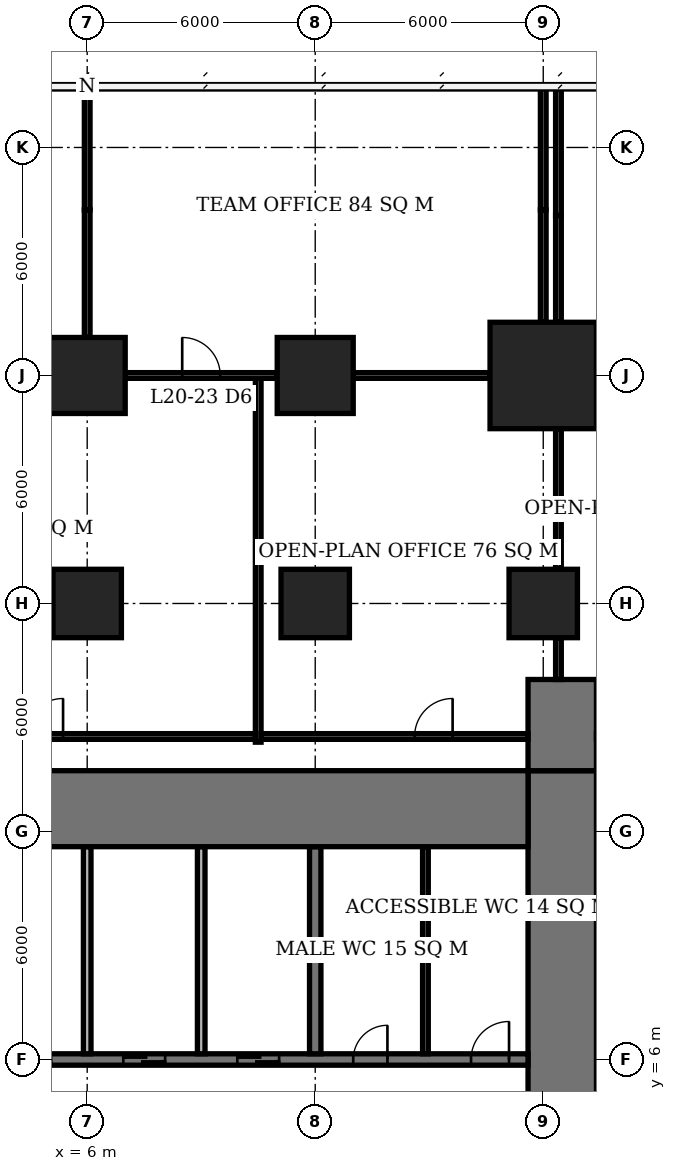
"""IFC4 building model, lengths in metres.
Left out: names, types, materials, properties, quantities, classifications, styles, units other than length and angle.
Written with IfcOpenShell. Run it as: python <this file> out.ifc"""

import sys

from ifc_helpers import new_model, si_unit, direction, frame, frame_2d, origin, origin_2d, place, context, subcontext, project, spatial, rectangle, extrude, element, fill, save


model = new_model("IFC4")
c1 = context("Model", 3, precision=1e-05, world=origin(), true_north=direction((0.0, 1.0)))
c2 = subcontext(c1, "Body", "Model", "MODEL_VIEW")
j1 = project(units=[si_unit("LENGTHUNIT", "METRE"), si_unit("PLANEANGLEUNIT", "RADIAN")], contexts=[c1])
p1 = place(None, origin())
s1 = spatial("IfcSite", under=j1, at=p1, CompositionType="ELEMENT")
p2 = place(p1, origin())
s2 = spatial("IfcBuilding", under=s1, at=p2, CompositionType="ELEMENT")
p3 = place(p2, frame((0.0, 0.0, 84.5)))
s3 = spatial("IfcBuildingStorey", under=s2, at=p3, CompositionType="ELEMENT", Elevation=84.5)
p4 = place(p3, frame((6.0, 18.0, 0.0), z_axis=(0.0, 0.0, 1.0), x_axis=(1.0, 0.0, 0.0)))
e1 = element("IfcColumn", 1, at=p4, inside=s3, PredefinedType="COLUMN", context=c2, shape_type="SweptSolid", body=[
    extrude(rectangle(XDim=1.8, YDim=1.8, at=origin_2d()), origin(), (0.0, 0.0, 1.0), 3.9),
])
p5 = place(p3, frame((6.0, 24.0, 0.0), z_axis=(0.0, 0.0, 1.0), x_axis=(1.0, 0.0, 0.0)))
e2 = element("IfcColumn", 2, at=p5, inside=s3, PredefinedType="COLUMN", context=c2, shape_type="SweptSolid", body=[
    extrude(rectangle(XDim=2.0, YDim=2.0, at=origin_2d()), origin(), (0.0, 0.0, 1.0), 3.9),
])
p6 = place(p3, frame((12.0, 18.0, 0.0), z_axis=(0.0, 0.0, 1.0), x_axis=(1.0, 0.0, 0.0)))
e3 = element("IfcColumn", 3, at=p6, inside=s3, PredefinedType="COLUMN", context=c2, shape_type="SweptSolid", body=[
    extrude(rectangle(XDim=1.8, YDim=1.8, at=origin_2d()), origin(), (0.0, 0.0, 1.0), 3.9),
])
p7 = place(p3, frame((12.0, 24.0, 0.0), z_axis=(0.0, 0.0, 1.0), x_axis=(1.0, 0.0, 0.0)))
e4 = element("IfcColumn", 4, at=p7, inside=s3, PredefinedType="COLUMN", context=c2, shape_type="SweptSolid", body=[
    extrude(rectangle(XDim=2.0, YDim=2.0, at=origin_2d()), origin(), (0.0, 0.0, 1.0), 3.9),
])
p8 = place(p3, frame((18.0, 18.0, 0.0), z_axis=(0.0, 0.0, 1.0), x_axis=(1.0, 0.0, 0.0)))
e5 = element("IfcColumn", 5, at=p8, inside=s3, PredefinedType="COLUMN", context=c2, shape_type="SweptSolid", body=[
    extrude(rectangle(XDim=1.8, YDim=1.8, at=origin_2d()), origin(), (0.0, 0.0, 1.0), 3.9),
])
p9 = place(p3, frame((18.0, 24.0, 0.0), z_axis=(0.0, 0.0, 1.0), x_axis=(1.0, 0.0, 0.0)))
e6 = element("IfcColumn", 6, at=p9, inside=s3, PredefinedType="COLUMN", context=c2, shape_type="SweptSolid", body=[
    extrude(rectangle(XDim=2.8, YDim=2.8, at=origin_2d()), origin(), (0.0, 0.0, 1.0), 3.9),
])
p10 = place(p3, frame((-5.6, 12.6, 0.0), z_axis=(0.0, 0.0, 1.0), x_axis=(1.0, 0.0, 0.0)))
e7 = element("IfcWall", 7, at=p10, inside=s3, PredefinedType="SHEAR", context=c2, shape_type="SweptSolid", body=[
    extrude(rectangle(XDim=23.2, YDim=2.0, at=frame_2d((11.6, 0.0))), origin(), (0.0, 0.0, 1.0), 3.9),
])
p11 = place(p3, frame((18.5, -7.6, 0.0), z_axis=(0.0, 0.0, 1.0), x_axis=(0.0, 1.0, 0.0)))
e8 = element("IfcWall", 8, at=p11, inside=s3, PredefinedType="SHEAR", context=c2, shape_type="SweptSolid", body=[
    extrude(rectangle(XDim=21.2, YDim=1.8, at=frame_2d((10.6, 0.0))), origin(), (0.0, 0.0, 1.0), 3.9),
])
p12 = place(p11, frame((9.2, 0.0, 0.0)))
e9 = element("IfcOpeningElement", 9, at=p12, cuts=e8, PredefinedType="OPENING", context=c2, shape_type="SweptSolid", body=[
    extrude(rectangle(XDim=1.8, YDim=2.4, at=frame_2d((0.9, 1.2))), frame((0.0, 0.91, 0.0), z_axis=(0.0, -1.0, 0.0), x_axis=(1.0, 0.0, 0.0)), (0.0, 0.0, 1.0), 1.82),
])
p13 = place(p3, frame((18.5, 13.6, 0.0), z_axis=(0.0, 0.0, 1.0), x_axis=(0.0, 1.0, 0.0)))
e10 = element("IfcWall", 10, at=p13, inside=s3, PredefinedType="SHEAR", context=c2, shape_type="SweptSolid", body=[
    extrude(rectangle(XDim=2.4, YDim=1.8, at=frame_2d((1.2, 0.0))), origin(), (0.0, 0.0, 1.0), 3.9),
])
p14 = place(p3, frame((-0.15, 6.0, 0.0), z_axis=(0.0, 0.0, 1.0), x_axis=(1.0, 0.0, 0.0)))
e11 = element("IfcWall", 11, at=p14, inside=s3, PredefinedType="SHEAR", context=c2, shape_type="SweptSolid", body=[
    extrude(rectangle(XDim=17.75, YDim=0.3, at=frame_2d((8.875, 0.0))), origin(), (0.0, 0.0, 1.0), 3.9),
])
p15 = place(p14, frame((13.15, 0.0, 0.0)))
e12 = element("IfcOpeningElement", 12, at=p15, cuts=e11, PredefinedType="OPENING", context=c2, shape_type="SweptSolid", body=[
    extrude(rectangle(XDim=0.9, YDim=2.1, at=frame_2d((0.45, 1.05))), frame((0.0, 0.16, 0.0), z_axis=(0.0, -1.0, 0.0), x_axis=(1.0, 0.0, 0.0)), (0.0, 0.0, 1.0), 0.32),
])
p16 = place(p14, frame((16.25, 0.0, 0.0)))
e13 = element("IfcOpeningElement", 13, at=p16, cuts=e11, PredefinedType="OPENING", context=c2, shape_type="SweptSolid", body=[
    extrude(rectangle(XDim=1.0, YDim=2.1, at=frame_2d((0.5, 1.05))), frame((0.0, 0.16, 0.0), z_axis=(0.0, -1.0, 0.0), x_axis=(1.0, 0.0, 0.0)), (0.0, 0.0, 1.0), 0.32),
])
p17 = place(p14, frame((1.1, 0.0, 0.0)))
e14 = element("IfcOpeningElement", 14, at=p17, cuts=e11, PredefinedType="OPENING", context=c2, shape_type="SweptSolid", body=[
    extrude(rectangle(XDim=1.1, YDim=2.1, at=frame_2d((0.55, 1.05))), frame((0.0, 0.16, 0.0), z_axis=(0.0, -1.0, 0.0), x_axis=(1.0, 0.0, 0.0)), (0.0, 0.0, 1.0), 0.32),
])
p18 = place(p14, frame((4.1, 0.0, 0.0)))
e15 = element("IfcOpeningElement", 15, at=p18, cuts=e11, PredefinedType="OPENING", context=c2, shape_type="SweptSolid", body=[
    extrude(rectangle(XDim=1.1, YDim=2.1, at=frame_2d((0.55, 1.05))), frame((0.0, 0.16, 0.0), z_axis=(0.0, -1.0, 0.0), x_axis=(1.0, 0.0, 0.0)), (0.0, 0.0, 1.0), 0.32),
])
p19 = place(p14, frame((7.1, 0.0, 0.0)))
e16 = element("IfcOpeningElement", 16, at=p19, cuts=e11, PredefinedType="OPENING", context=c2, shape_type="SweptSolid", body=[
    extrude(rectangle(XDim=1.1, YDim=2.1, at=frame_2d((0.55, 1.05))), frame((0.0, 0.16, 0.0), z_axis=(0.0, -1.0, 0.0), x_axis=(1.0, 0.0, 0.0)), (0.0, 0.0, 1.0), 0.32),
])
p20 = place(p14, frame((10.1, 0.0, 0.0)))
e17 = element("IfcOpeningElement", 17, at=p20, cuts=e11, PredefinedType="OPENING", context=c2, shape_type="SweptSolid", body=[
    extrude(rectangle(XDim=1.1, YDim=2.1, at=frame_2d((0.55, 1.05))), frame((0.0, 0.16, 0.0), z_axis=(0.0, -1.0, 0.0), x_axis=(1.0, 0.0, 0.0)), (0.0, 0.0, 1.0), 0.32),
])
p21 = place(p3, frame((12.0, 6.15, 0.0), z_axis=(0.0, 0.0, 1.0), x_axis=(0.0, 1.0, 0.0)))
e18 = element("IfcWall", 18, at=p21, inside=s3, PredefinedType="SHEAR", context=c2, shape_type="SweptSolid", body=[
    extrude(rectangle(XDim=5.45, YDim=0.3, at=frame_2d((2.725, 0.0))), origin(), (0.0, 0.0, 1.0), 3.9),
])
for number, where, z_axis, x_axis in (
    (19, (6.0, 6.15, 0.0), (0.0, 0.0, 1.0), (0.0, 1.0, 0.0)),
    (20, (9.0, 6.15, 0.0), (0.0, 0.0, 1.0), (0.0, 1.0, 0.0)),
):
    element("IfcWall", number, at=place(p3, frame(where, z_axis=z_axis, x_axis=x_axis)), inside=s3, PredefinedType="SOLIDWALL", context=c2, shape_type="SweptSolid", body=[
        extrude(rectangle(XDim=5.45, YDim=0.2, at=frame_2d((2.725, 0.0))), origin(), (0.0, 0.0, 1.0), 3.9),
    ])
p22 = place(p3, frame((14.9, 6.15, 0.0), z_axis=(0.0, 0.0, 1.0), x_axis=(0.0, 1.0, 0.0)))
e21 = element("IfcWall", 21, at=p22, inside=s3, PredefinedType="PLUMBINGWALL", context=c2, shape_type="SweptSolid", body=[
    extrude(rectangle(XDim=5.45, YDim=0.15, at=frame_2d((2.725, 0.0))), origin(), (0.0, 0.0, 1.0), 3.65),
])
p23 = place(p3, frame((7.0, 24.0, 0.0), z_axis=(0.0, 0.0, 1.0), x_axis=(1.0, 0.0, 0.0)))
e22 = element("IfcWall", 22, at=p23, inside=s3, PredefinedType="PARTITIONING", context=c2, shape_type="SweptSolid", body=[
    extrude(rectangle(XDim=4.0, YDim=0.15, at=frame_2d((2.0, 0.0))), origin(), (0.0, 0.0, 1.0), 3.65),
])
p24 = place(p23, frame((1.5, 0.0, 0.0)))
e23 = element("IfcOpeningElement", 23, at=p24, cuts=e22, PredefinedType="OPENING", context=c2, shape_type="SweptSolid", body=[
    extrude(rectangle(XDim=1.0, YDim=2.1, at=frame_2d((0.5, 1.05))), frame((0.0, 0.085, 0.0), z_axis=(0.0, -1.0, 0.0), x_axis=(1.0, 0.0, 0.0)), (0.0, 0.0, 1.0), 0.17),
])
p25 = place(p3, frame((13.0, 24.0, 0.0), z_axis=(0.0, 0.0, 1.0), x_axis=(1.0, 0.0, 0.0)))
e24 = element("IfcWall", 24, at=p25, inside=s3, PredefinedType="PARTITIONING", context=c2, shape_type="SweptSolid", body=[
    extrude(rectangle(XDim=3.6, YDim=0.15, at=frame_2d((1.8, 0.0))), origin(), (0.0, 0.0, 1.0), 3.65),
])
p26 = place(p3, frame((6.0, 25.0, 0.0), z_axis=(0.0, 0.0, 1.0), x_axis=(0.0, 1.0, 0.0)))
e25 = element("IfcWall", 25, at=p26, inside=s3, PredefinedType="PARTITIONING", context=c2, shape_type="SweptSolid", body=[
    extrude(rectangle(XDim=3.36, YDim=0.15, at=frame_2d((1.68, 0.0))), origin(), (0.0, 0.0, 1.0), 2.15),
])
p27 = place(p3, frame((6.0, 28.36, 0.0), z_axis=(0.0, 0.0, 1.0), x_axis=(0.0, 1.0, 0.0)))
e26 = element("IfcWall", 26, at=p27, inside=s3, PredefinedType="PARTITIONING", context=c2, shape_type="SweptSolid", body=[
    extrude(rectangle(XDim=3.19, YDim=0.15, at=frame_2d((1.595, 0.0))), origin(), (0.0, 0.0, 1.0), 3.65),
])
p28 = place(p3, frame((18.0, 25.4, 0.0), z_axis=(0.0, 0.0, 1.0), x_axis=(0.0, 1.0, 0.0)))
e27 = element("IfcWall", 27, at=p28, inside=s3, PredefinedType="PARTITIONING", context=c2, shape_type="SweptSolid", body=[
    extrude(rectangle(XDim=2.96, YDim=0.15, at=frame_2d((1.48, 0.0))), origin(), (0.0, 0.0, 1.0), 2.15),
])
p29 = place(p3, frame((18.0, 28.36, 0.0), z_axis=(0.0, 0.0, 1.0), x_axis=(0.0, 1.0, 0.0)))
e28 = element("IfcWall", 28, at=p29, inside=s3, PredefinedType="PARTITIONING", context=c2, shape_type="SweptSolid", body=[
    extrude(rectangle(XDim=3.24, YDim=0.15, at=frame_2d((1.62, 0.0))), origin(), (0.0, 0.0, 1.0), 3.65),
])
p30 = place(p3, frame((-5.6, 14.5, 0.0), z_axis=(0.0, 0.0, 1.0), x_axis=(1.0, 0.0, 0.0)))
e29 = element("IfcWall", 29, at=p30, inside=s3, PredefinedType="PARTITIONING", context=c2, shape_type="SweptSolid", body=[
    extrude(rectangle(XDim=16.025, YDim=0.15, at=frame_2d((8.013, 0.0))), origin(), (0.0, 0.0, 1.0), 3.65),
])
p31 = place(p30, frame((9.965, 0.0, 0.0)))
e30 = element("IfcOpeningElement", 30, at=p31, cuts=e29, PredefinedType="OPENING", context=c2, shape_type="SweptSolid", body=[
    extrude(rectangle(XDim=1.0, YDim=2.1, at=frame_2d((0.5, 1.05))), frame((0.0, 0.085, 0.0), z_axis=(0.0, -1.0, 0.0), x_axis=(1.0, 0.0, 0.0)), (0.0, 0.0, 1.0), 0.17),
])
p32 = place(p3, frame((10.5, 14.35, 0.0), z_axis=(0.0, 0.0, 1.0), x_axis=(0.0, 1.0, 0.0)))
e31 = element("IfcWall", 31, at=p32, inside=s3, PredefinedType="PARTITIONING", context=c2, shape_type="SweptSolid", body=[
    extrude(rectangle(XDim=9.575, YDim=0.15, at=frame_2d((4.788, 0.0))), origin(), (0.0, 0.0, 1.0), 3.65),
])
p33 = place(p3, frame((10.575, 14.5, 0.0), z_axis=(0.0, 0.0, 1.0), x_axis=(1.0, 0.0, 0.0)))
e32 = element("IfcWall", 32, at=p33, inside=s3, PredefinedType="PARTITIONING", context=c2, shape_type="SweptSolid", body=[
    extrude(rectangle(XDim=7.025, YDim=0.15, at=frame_2d((3.513, 0.0))), origin(), (0.0, 0.0, 1.0), 3.65),
])
p34 = place(p33, frame((4.04, 0.0, 0.0)))
e33 = element("IfcOpeningElement", 33, at=p34, cuts=e32, PredefinedType="OPENING", context=c2, shape_type="SweptSolid", body=[
    extrude(rectangle(XDim=1.0, YDim=2.1, at=frame_2d((0.5, 1.05))), frame((0.0, 0.085, 0.0), z_axis=(0.0, -1.0, 0.0), x_axis=(1.0, 0.0, 0.0)), (0.0, 0.0, 1.0), 0.17),
])
p35 = place(p3, frame((18.4, 16.0, 0.0), z_axis=(0.0, 0.0, 1.0), x_axis=(0.0, 1.0, 0.0)))
e34 = element("IfcWall", 34, at=p35, inside=s3, PredefinedType="PARTITIONING", context=c2, shape_type="SweptSolid", body=[
    extrude(rectangle(XDim=1.1, YDim=0.15, at=frame_2d((0.55, 0.0))), origin(), (0.0, 0.0, 1.0), 3.65),
])
p36 = place(p3, frame((18.4, 18.9, 0.0), z_axis=(0.0, 0.0, 1.0), x_axis=(0.0, 1.0, 0.0)))
e35 = element("IfcWall", 35, at=p36, inside=s3, PredefinedType="PARTITIONING", context=c2, shape_type="SweptSolid", body=[
    extrude(rectangle(XDim=3.7, YDim=0.15, at=frame_2d((1.85, 0.0))), origin(), (0.0, 0.0, 1.0), 3.65),
])
p37 = place(p3, frame((18.4, 25.4, 0.0), z_axis=(0.0, 0.0, 1.0), x_axis=(0.0, 1.0, 0.0)))
e36 = element("IfcWall", 36, at=p37, inside=s3, PredefinedType="PARTITIONING", context=c2, shape_type="SweptSolid", body=[
    extrude(rectangle(XDim=2.811, YDim=0.15, at=frame_2d((1.405, 0.0))), origin(), (0.0, 0.0, 1.0), 2.15),
])
p38 = place(p3, frame((18.4, 28.211, 0.0), z_axis=(0.0, 0.0, 1.0), x_axis=(0.0, 1.0, 0.0)))
e37 = element("IfcWall", 37, at=p38, inside=s3, PredefinedType="PARTITIONING", context=c2, shape_type="SweptSolid", body=[
    extrude(rectangle(XDim=3.339, YDim=0.15, at=frame_2d((1.67, 0.0))), origin(), (0.0, 0.0, 1.0), 3.65),
])
p39 = place(p3, frame((19.4, 14.5, 0.0), z_axis=(0.0, 0.0, 1.0), x_axis=(1.0, 0.0, 0.0)))
e38 = element("IfcWall", 38, at=p39, inside=s3, PredefinedType="PARTITIONING", context=c2, shape_type="SweptSolid", body=[
    extrude(rectangle(XDim=1.175, YDim=0.15, at=frame_2d((0.587, 0.0))), origin(), (0.0, 0.0, 1.0), 3.65),
])
p40 = place(p15, origin())
e39 = element("IfcDoor", 39, at=p40, inside=s3, OperationType="SINGLE_SWING_RIGHT", PredefinedType="DOOR", context=c2, shape_type="SweptSolid", body=[
    extrude(rectangle(XDim=0.9, YDim=2.1, at=frame_2d((0.45, 1.05))), frame((0.0, 0.025, 0.0), z_axis=(0.0, -1.0, 0.0), x_axis=(1.0, 0.0, 0.0)), (0.0, 0.0, 1.0), 0.05),
])
fill(e12, e39)
p41 = place(p16, origin())
e40 = element("IfcDoor", 40, at=p41, inside=s3, OperationType="SINGLE_SWING_RIGHT", PredefinedType="DOOR", context=c2, shape_type="SweptSolid", body=[
    extrude(rectangle(XDim=1.0, YDim=2.1, at=frame_2d((0.5, 1.05))), frame((0.0, 0.025, 0.0), z_axis=(0.0, -1.0, 0.0), x_axis=(1.0, 0.0, 0.0)), (0.0, 0.0, 1.0), 0.05),
])
fill(e13, e40)
p42 = place(p19, origin())
e41 = element("IfcDoor", 41, at=p42, inside=s3, OperationType="DOUBLE_DOOR_SLIDING", PredefinedType="USERDEFINED", context=c2, shape_type="SweptSolid", body=[
    extrude(rectangle(XDim=1.1, YDim=2.1, at=frame_2d((0.55, 1.05))), frame((0.0, 0.025, 0.0), z_axis=(0.0, -1.0, 0.0), x_axis=(1.0, 0.0, 0.0)), (0.0, 0.0, 1.0), 0.05),
])
fill(e16, e41)
p43 = place(p20, origin())
e42 = element("IfcDoor", 42, at=p43, inside=s3, OperationType="DOUBLE_DOOR_SLIDING", PredefinedType="USERDEFINED", context=c2, shape_type="SweptSolid", body=[
    extrude(rectangle(XDim=1.1, YDim=2.1, at=frame_2d((0.55, 1.05))), frame((0.0, 0.025, 0.0), z_axis=(0.0, -1.0, 0.0), x_axis=(1.0, 0.0, 0.0)), (0.0, 0.0, 1.0), 0.05),
])
fill(e17, e42)
p44 = place(p24, origin())
e43 = element("IfcDoor", 43, at=p44, inside=s3, OperationType="SINGLE_SWING_LEFT", PredefinedType="DOOR", context=c2, shape_type="SweptSolid", body=[
    extrude(rectangle(XDim=1.0, YDim=2.1, at=frame_2d((0.5, 1.05))), frame((0.0, 0.025, 0.0), z_axis=(0.0, -1.0, 0.0), x_axis=(1.0, 0.0, 0.0)), (0.0, 0.0, 1.0), 0.05),
])
fill(e23, e43)
p45 = place(p34, origin())
e44 = element("IfcDoor", 44, at=p45, inside=s3, OperationType="SINGLE_SWING_RIGHT", PredefinedType="DOOR", context=c2, shape_type="SweptSolid", body=[
    extrude(rectangle(XDim=1.0, YDim=2.1, at=frame_2d((0.5, 1.05))), frame((0.0, 0.025, 0.0), z_axis=(0.0, -1.0, 0.0), x_axis=(1.0, 0.0, 0.0)), (0.0, 0.0, 1.0), 0.05),
])
fill(e33, e44)
p46 = place(p31, origin())
e45 = element("IfcDoor", 45, at=p46, inside=s3, OperationType="SINGLE_SWING_RIGHT", PredefinedType="DOOR", context=c2, shape_type="SweptSolid", body=[
    extrude(rectangle(XDim=1.0, YDim=2.1, at=frame_2d((0.5, 1.05))), frame((0.0, 0.025, 0.0), z_axis=(0.0, -1.0, 0.0), x_axis=(1.0, 0.0, 0.0)), (0.0, 0.0, 1.0), 0.05),
])
fill(e30, e45)
save(model, sys.argv[1])
